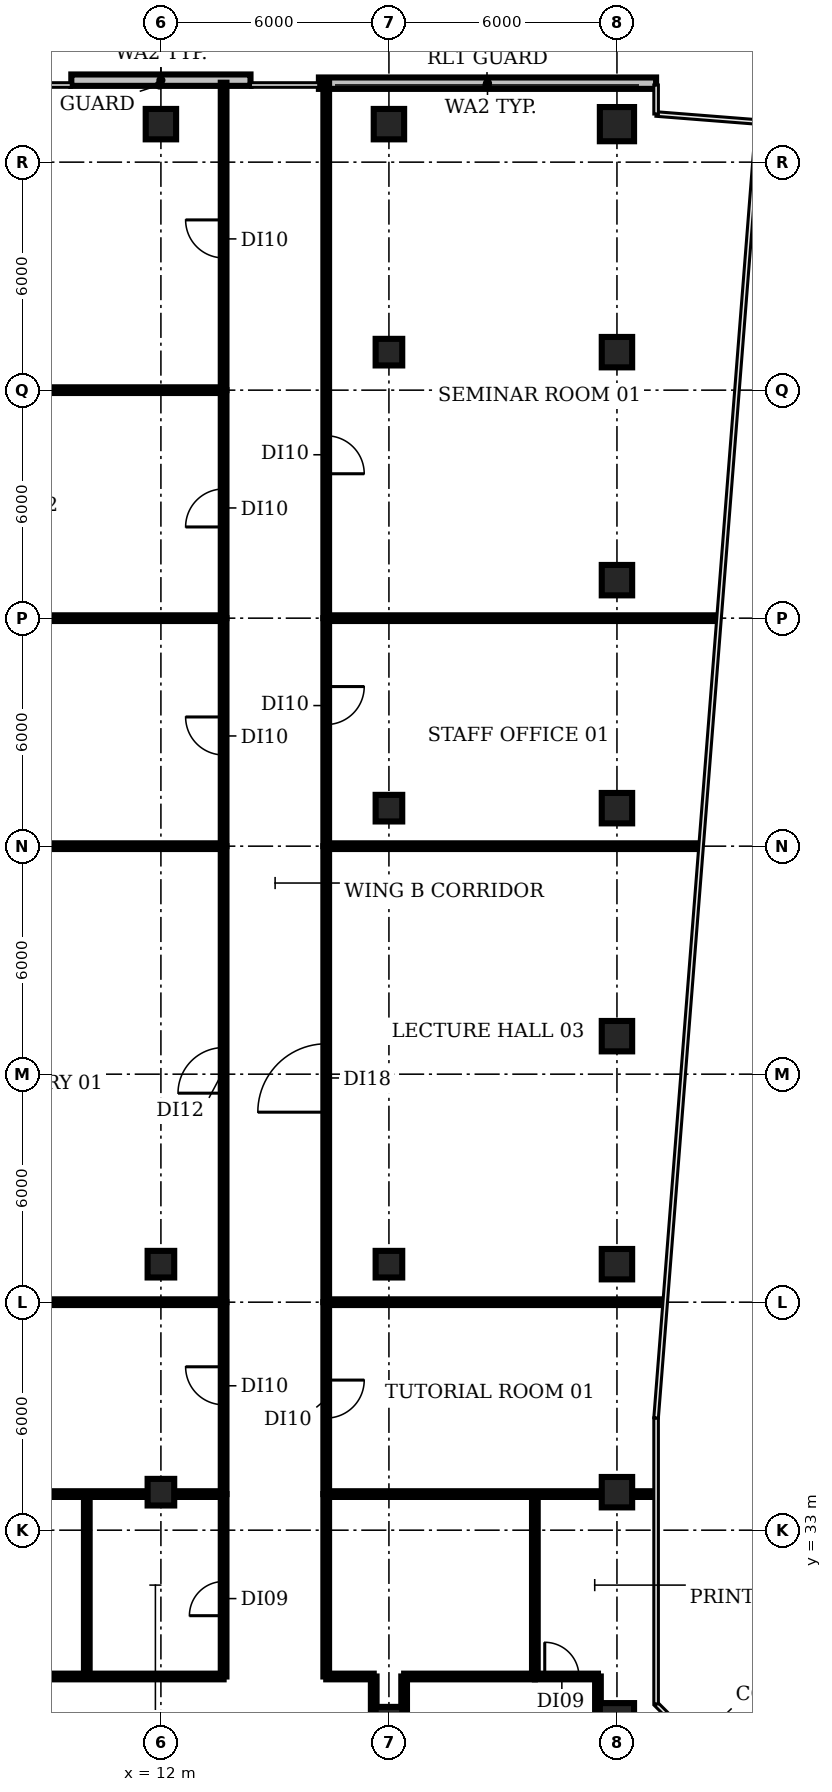
"""IFC4 building model, lengths in metres.
Left out: names, types, materials, properties, quantities, classifications, styles, units other than length and angle.
Written with IfcOpenShell. Run it as: python <this file> out.ifc"""

import sys

from ifc_helpers import new_model, si_unit, direction, frame, frame_2d, origin, origin_2d, place, context, subcontext, project, spatial, rectangle, circle, extrude, element, fill, save


model = new_model("IFC4")
c1 = context("Model", 3, precision=1e-05, world=origin(), true_north=direction((0.0, 1.0)))
c2 = subcontext(c1, "Body", "Model", "MODEL_VIEW")
j1 = project(units=[si_unit("LENGTHUNIT", "METRE"), si_unit("PLANEANGLEUNIT", "RADIAN")], contexts=[c1])
p1 = place(None, origin())
s1 = spatial("IfcSite", under=j1, at=p1, CompositionType="ELEMENT")
p2 = place(p1, origin())
s2 = spatial("IfcBuilding", under=s1, at=p2, CompositionType="ELEMENT")
p3 = place(p2, frame((0.0, 0.0, 247.4)))
s3 = spatial("IfcBuildingStorey", under=s2, at=p3, CompositionType="ELEMENT", Elevation=247.4)
for number, where, z_axis, x_axis in (
    (1, (12.0, 34.0, 0.0), (0.0, 0.0, 1.0), (1.0, 0.0, 0.0)),
    (2, (12.0, 40.0, 0.0), (0.0, 0.0, 1.0), (1.0, 0.0, 0.0)),
):
    element("IfcColumn", number, at=place(p3, frame(where, z_axis=z_axis, x_axis=x_axis)), inside=s3, PredefinedType="COLUMN", context=c2, shape_type="SweptSolid", body=[
        extrude(rectangle(XDim=0.7, YDim=0.7, at=origin_2d()), origin(), (0.0, 0.0, 1.0), 3.85),
    ])
p4 = place(p3, frame((12.0, 70.0, 0.0), z_axis=(0.0, 0.0, 1.0), x_axis=(1.0, 0.0, 0.0)))
e3 = element("IfcColumn", 3, at=p4, inside=s3, PredefinedType="COLUMN", context=c2, shape_type="SweptSolid", body=[
    extrude(rectangle(XDim=0.8, YDim=0.8, at=origin_2d()), origin(), (0.0, 0.0, 1.0), 3.85),
])
for number, where, z_axis, x_axis in (
    (4, (18.0, 28.0, 0.0), (0.0, 0.0, 1.0), (1.0, 0.0, 0.0)),
    (5, (18.0, 40.0, 0.0), (0.0, 0.0, 1.0), (1.0, 0.0, 0.0)),
    (6, (18.0, 52.0, 0.0), (0.0, 0.0, 1.0), (1.0, 0.0, 0.0)),
    (7, (18.0, 64.0, 0.0), (0.0, 0.0, 1.0), (1.0, 0.0, 0.0)),
):
    element("IfcColumn", number, at=place(p3, frame(where, z_axis=z_axis, x_axis=x_axis)), inside=s3, PredefinedType="COLUMN", context=c2, shape_type="SweptSolid", body=[
        extrude(rectangle(XDim=0.7, YDim=0.7, at=origin_2d()), origin(), (0.0, 0.0, 1.0), 3.85),
    ])
p5 = place(p3, frame((18.0, 70.0, 0.0), z_axis=(0.0, 0.0, 1.0), x_axis=(1.0, 0.0, 0.0)))
e8 = element("IfcColumn", 8, at=p5, inside=s3, PredefinedType="COLUMN", context=c2, shape_type="SweptSolid", body=[
    extrude(rectangle(XDim=0.8, YDim=0.8, at=origin_2d()), origin(), (0.0, 0.0, 1.0), 3.85),
])
p6 = place(p3, frame((24.0, 28.0, 0.0), z_axis=(0.0, 0.0, 1.0), x_axis=(1.0, 0.0, 0.0)))
e9 = element("IfcColumn", 9, at=p6, inside=s3, PredefinedType="COLUMN", context=c2, shape_type="SweptSolid", body=[
    extrude(circle(Radius=0.45, at=origin_2d()), origin(), (0.0, 0.0, 1.0), 3.85),
])
for number, where, z_axis, x_axis in (
    (10, (24.0, 34.0, 0.0), (0.0, 0.0, 1.0), (1.0, 0.0, 0.0)),
    (11, (24.0, 40.0, 0.0), (0.0, 0.0, 1.0), (1.0, 0.0, 0.0)),
    (12, (24.0, 46.0, 0.0), (0.0, 0.0, 1.0), (1.0, 0.0, 0.0)),
    (13, (24.0, 52.0, 0.0), (0.0, 0.0, 1.0), (1.0, 0.0, 0.0)),
    (14, (24.0, 58.0, 0.0), (0.0, 0.0, 1.0), (1.0, 0.0, 0.0)),
    (15, (24.0, 64.0, 0.0), (0.0, 0.0, 1.0), (1.0, 0.0, 0.0)),
):
    element("IfcColumn", number, at=place(p3, frame(where, z_axis=z_axis, x_axis=x_axis)), inside=s3, PredefinedType="COLUMN", context=c2, shape_type="SweptSolid", body=[
        extrude(rectangle(XDim=0.8, YDim=0.8, at=origin_2d()), origin(), (0.0, 0.0, 1.0), 3.85),
    ])
p7 = place(p3, frame((24.0, 70.0, 0.0), z_axis=(0.0, 0.0, 1.0), x_axis=(1.0, 0.0, 0.0)))
e16 = element("IfcColumn", 16, at=p7, inside=s3, PredefinedType="COLUMN", context=c2, shape_type="SweptSolid", body=[
    extrude(circle(Radius=0.45, at=origin_2d()), origin(), (0.0, 0.0, 1.0), 3.85),
])
p8 = place(p3, frame((25.03, 71.078, 0.0), z_axis=(0.0, 0.0, 1.0), x_axis=(-1.0, 0.0, 0.0)))
e17 = element("IfcWall", 17, at=p8, inside=s3, PredefinedType="SOLIDWALL", context=c2, shape_type="SweptSolid", body=[
    extrude(rectangle(XDim=8.873, YDim=0.3, at=frame_2d((4.436, 0.0))), origin(), (0.0, 0.0, 1.0), 3.85),
])
p9 = place(p3, frame((14.357, 71.157, 0.0), z_axis=(0.0, 0.0, 1.0), x_axis=(-1.0, 0.0, 0.0)))
e18 = element("IfcWall", 18, at=p9, inside=s3, PredefinedType="SOLIDWALL", context=c2, shape_type="SweptSolid", body=[
    extrude(rectangle(XDim=4.715, YDim=0.3, at=frame_2d((2.357, 0.0))), origin(), (0.0, 0.0, 1.0), 3.85),
])
p10 = place(p3, frame((-1.22, 33.95, 0.0), z_axis=(0.0, 0.0, 1.0), x_axis=(1.0, 0.0, 0.0)))
e19 = element("IfcWall", 19, at=p10, inside=s3, PredefinedType="PARTITIONING", context=c2, shape_type="SweptSolid", body=[
    extrude(rectangle(XDim=14.87, YDim=0.15, at=frame_2d((7.435, 0.0))), origin(), (0.0, 0.0, 1.0), 2.88),
])
for number, where, z_axis, x_axis in (
    (20, (-0.98, 39.0, 0.0), (0.0, 0.0, 1.0), (1.0, 0.0, 0.0)),
    (21, (-0.98, 51.0, 0.0), (0.0, 0.0, 1.0), (1.0, 0.0, 0.0)),
    (22, (-0.98, 57.0, 0.0), (0.0, 0.0, 1.0), (1.0, 0.0, 0.0)),
    (23, (-0.98, 63.0, 0.0), (0.0, 0.0, 1.0), (1.0, 0.0, 0.0)),
):
    element("IfcWall", number, at=place(p3, frame(where, z_axis=z_axis, x_axis=x_axis)), inside=s3, PredefinedType="PARTITIONING", context=c2, shape_type="SweptSolid", body=[
        extrude(rectangle(XDim=14.63, YDim=0.15, at=frame_2d((7.315, 0.0))), origin(), (0.0, 0.0, 1.0), 2.88),
    ])
p11 = place(p3, frame((6.4, 29.15, 0.0), z_axis=(0.0, 0.0, 1.0), x_axis=(1.0, 0.0, 0.0)))
e24 = element("IfcWall", 24, at=p11, inside=s3, PredefinedType="PARTITIONING", context=c2, shape_type="SweptSolid", body=[
    extrude(rectangle(XDim=7.25, YDim=0.15, at=frame_2d((3.625, 0.0))), origin(), (0.0, 0.0, 1.0), 2.88),
])
p12 = place(p3, frame((10.05, 29.15, 0.0), z_axis=(0.0, 0.0, 1.0), x_axis=(0.0, 1.0, 0.0)))
e25 = element("IfcWall", 25, at=p12, inside=s3, PredefinedType="PARTITIONING", context=c2, shape_type="SweptSolid", body=[
    extrude(rectangle(XDim=4.8, YDim=0.15, at=frame_2d((2.4, 0.0))), origin(), (0.0, 0.0, 1.0), 2.88),
])
p13 = place(p3, frame((13.65, 29.15, 0.0), z_axis=(0.0, 0.0, 1.0), x_axis=(0.0, 1.0, 0.0)))
e26 = element("IfcWall", 26, at=p13, inside=s3, PredefinedType="PARTITIONING", context=c2, shape_type="SweptSolid", body=[
    extrude(rectangle(XDim=4.8, YDim=0.15, at=frame_2d((2.4, 0.0))), origin(), (0.0, 0.0, 1.0), 2.88),
])
p14 = place(p13, frame((1.6, 0.0, 0.0)))
e27 = element("IfcOpeningElement", 27, at=p14, cuts=e26, PredefinedType="OPENING", context=c2, shape_type="SweptSolid", body=[
    extrude(rectangle(XDim=0.9, YDim=2.1, at=frame_2d((0.45, 1.05))), frame((0.0, 0.085, 0.0), z_axis=(0.0, -1.0, 0.0), x_axis=(1.0, 0.0, 0.0)), (0.0, 0.0, 1.0), 0.17),
])
p15 = place(p3, frame((13.65, 33.95, 0.0), z_axis=(0.0, 0.0, 1.0), x_axis=(0.0, 1.0, 0.0)))
e28 = element("IfcWall", 28, at=p15, inside=s3, PredefinedType="PARTITIONING", context=c2, shape_type="SweptSolid", body=[
    extrude(rectangle(XDim=5.05, YDim=0.15, at=frame_2d((2.525, 0.0))), origin(), (0.0, 0.0, 1.0), 2.88),
])
p16 = place(p15, frame((2.35, 0.0, 0.0)))
e29 = element("IfcOpeningElement", 29, at=p16, cuts=e28, PredefinedType="OPENING", context=c2, shape_type="SweptSolid", body=[
    extrude(rectangle(XDim=1.0, YDim=2.1, at=frame_2d((0.5, 1.05))), frame((0.0, 0.085, 0.0), z_axis=(0.0, -1.0, 0.0), x_axis=(1.0, 0.0, 0.0)), (0.0, 0.0, 1.0), 0.17),
])
p17 = place(p3, frame((13.65, 39.0, 0.0), z_axis=(0.0, 0.0, 1.0), x_axis=(0.0, 1.0, 0.0)))
e30 = element("IfcWall", 30, at=p17, inside=s3, PredefinedType="PARTITIONING", context=c2, shape_type="SweptSolid", body=[
    extrude(rectangle(XDim=12.0, YDim=0.15, at=frame_2d((6.0, 0.0))), origin(), (0.0, 0.0, 1.0), 2.88),
])
p18 = place(p17, frame((5.5, 0.0, 0.0)))
e31 = element("IfcOpeningElement", 31, at=p18, cuts=e30, PredefinedType="OPENING", context=c2, shape_type="SweptSolid", body=[
    extrude(rectangle(XDim=1.2, YDim=2.1, at=frame_2d((0.6, 1.05))), frame((0.0, 0.085, 0.0), z_axis=(0.0, -1.0, 0.0), x_axis=(1.0, 0.0, 0.0)), (0.0, 0.0, 1.0), 0.17),
])
p19 = place(p3, frame((13.65, 51.0, 0.0), z_axis=(0.0, 0.0, 1.0), x_axis=(0.0, 1.0, 0.0)))
e32 = element("IfcWall", 32, at=p19, inside=s3, PredefinedType="PARTITIONING", context=c2, shape_type="SweptSolid", body=[
    extrude(rectangle(XDim=6.0, YDim=0.15, at=frame_2d((3.0, 0.0))), origin(), (0.0, 0.0, 1.0), 2.88),
])
p20 = place(p19, frame((2.4, 0.0, 0.0)))
e33 = element("IfcOpeningElement", 33, at=p20, cuts=e32, PredefinedType="OPENING", context=c2, shape_type="SweptSolid", body=[
    extrude(rectangle(XDim=1.0, YDim=2.1, at=frame_2d((0.5, 1.05))), frame((0.0, 0.085, 0.0), z_axis=(0.0, -1.0, 0.0), x_axis=(1.0, 0.0, 0.0)), (0.0, 0.0, 1.0), 0.17),
])
p21 = place(p3, frame((13.65, 57.0, 0.0), z_axis=(0.0, 0.0, 1.0), x_axis=(0.0, 1.0, 0.0)))
e34 = element("IfcWall", 34, at=p21, inside=s3, PredefinedType="PARTITIONING", context=c2, shape_type="SweptSolid", body=[
    extrude(rectangle(XDim=6.0, YDim=0.15, at=frame_2d((3.0, 0.0))), origin(), (0.0, 0.0, 1.0), 2.88),
])
p22 = place(p21, frame((2.4, 0.0, 0.0)))
e35 = element("IfcOpeningElement", 35, at=p22, cuts=e34, PredefinedType="OPENING", context=c2, shape_type="SweptSolid", body=[
    extrude(rectangle(XDim=1.0, YDim=2.1, at=frame_2d((0.5, 1.05))), frame((0.0, 0.085, 0.0), z_axis=(0.0, -1.0, 0.0), x_axis=(1.0, 0.0, 0.0)), (0.0, 0.0, 1.0), 0.17),
])
p23 = place(p3, frame((13.65, 63.0, 0.0), z_axis=(0.0, 0.0, 1.0), x_axis=(0.0, 1.0, 0.0)))
e36 = element("IfcWall", 36, at=p23, inside=s3, PredefinedType="PARTITIONING", context=c2, shape_type="SweptSolid", body=[
    extrude(rectangle(XDim=8.09, YDim=0.15, at=frame_2d((4.045, 0.0))), origin(), (0.0, 0.0, 1.0), 2.88),
])
p24 = place(p23, frame((3.48, 0.0, 0.0)))
e37 = element("IfcOpeningElement", 37, at=p24, cuts=e36, PredefinedType="OPENING", context=c2, shape_type="SweptSolid", body=[
    extrude(rectangle(XDim=1.0, YDim=2.1, at=frame_2d((0.5, 1.05))), frame((0.0, 0.085, 0.0), z_axis=(0.0, -1.0, 0.0), x_axis=(1.0, 0.0, 0.0)), (0.0, 0.0, 1.0), 0.17),
])
p25 = place(p3, frame((16.35, 29.15, 0.0), z_axis=(0.0, 0.0, 1.0), x_axis=(0.0, 1.0, 0.0)))
e38 = element("IfcWall", 38, at=p25, inside=s3, PredefinedType="PARTITIONING", context=c2, shape_type="SweptSolid", body=[
    extrude(rectangle(XDim=4.8, YDim=0.15, at=frame_2d((2.4, 0.0))), origin(), (0.0, 0.0, 1.0), 2.88),
])
p26 = place(p3, frame((16.35, 29.15, 0.0), z_axis=(0.0, 0.0, 1.0), x_axis=(1.0, 0.0, 0.0)))
e39 = element("IfcWall", 39, at=p26, inside=s3, PredefinedType="PARTITIONING", context=c2, shape_type="SweptSolid", body=[
    extrude(rectangle(XDim=1.25, YDim=0.15, at=frame_2d((0.625, 0.0))), origin(), (0.0, 0.0, 1.0), 2.88),
])
p27 = place(p3, frame((16.35, 33.95, 0.0), z_axis=(0.0, 0.0, 1.0), x_axis=(1.0, 0.0, 0.0)))
e40 = element("IfcWall", 40, at=p27, inside=s3, PredefinedType="PARTITIONING", context=c2, shape_type="SweptSolid", body=[
    extrude(rectangle(XDim=8.63, YDim=0.15, at=frame_2d((4.315, 0.0))), origin(), (0.0, 0.0, 1.0), 2.88),
])
p28 = place(p3, frame((16.35, 39.0, 0.0), z_axis=(0.0, 0.0, 1.0), x_axis=(0.0, -1.0, 0.0)))
e41 = element("IfcWall", 41, at=p28, inside=s3, PredefinedType="PARTITIONING", context=c2, shape_type="SweptSolid", body=[
    extrude(rectangle(XDim=5.05, YDim=0.15, at=frame_2d((2.525, 0.0))), origin(), (0.0, 0.0, 1.0), 2.88),
])
p29 = place(p28, frame((2.05, 0.0, 0.0)))
e42 = element("IfcOpeningElement", 42, at=p29, cuts=e41, PredefinedType="OPENING", context=c2, shape_type="SweptSolid", body=[
    extrude(rectangle(XDim=1.0, YDim=2.1, at=frame_2d((0.5, 1.05))), frame((0.0, 0.085, 0.0), z_axis=(0.0, -1.0, 0.0), x_axis=(1.0, 0.0, 0.0)), (0.0, 0.0, 1.0), 0.17),
])
p30 = place(p3, frame((16.35, 39.0, 0.0), z_axis=(0.0, 0.0, 1.0), x_axis=(0.0, 1.0, 0.0)))
e43 = element("IfcWall", 43, at=p30, inside=s3, PredefinedType="PARTITIONING", context=c2, shape_type="SweptSolid", body=[
    extrude(rectangle(XDim=12.0, YDim=0.15, at=frame_2d((6.0, 0.0))), origin(), (0.0, 0.0, 1.0), 2.88),
])
p31 = place(p30, frame((5.0, 0.0, 0.0)))
e44 = element("IfcOpeningElement", 44, at=p31, cuts=e43, PredefinedType="OPENING", context=c2, shape_type="SweptSolid", body=[
    extrude(rectangle(XDim=1.8, YDim=2.1, at=frame_2d((0.9, 1.05))), frame((0.0, 0.085, 0.0), z_axis=(0.0, -1.0, 0.0), x_axis=(1.0, 0.0, 0.0)), (0.0, 0.0, 1.0), 0.17),
])
p32 = place(p3, frame((16.35, 39.0, 0.0), z_axis=(0.0, 0.0, 1.0), x_axis=(1.0, 0.0, 0.0)))
e45 = element("IfcWall", 45, at=p32, inside=s3, PredefinedType="PARTITIONING", context=c2, shape_type="SweptSolid", body=[
    extrude(rectangle(XDim=8.87, YDim=0.15, at=frame_2d((4.435, 0.0))), origin(), (0.0, 0.0, 1.0), 2.88),
])
p33 = place(p3, frame((16.35, 51.0, 0.0), z_axis=(0.0, 0.0, 1.0), x_axis=(1.0, 0.0, 0.0)))
e46 = element("IfcWall", 46, at=p33, inside=s3, PredefinedType="PARTITIONING", context=c2, shape_type="SweptSolid", body=[
    extrude(rectangle(XDim=9.81, YDim=0.15, at=frame_2d((4.905, 0.0))), origin(), (0.0, 0.0, 1.0), 2.88),
])
p34 = place(p3, frame((16.35, 57.0, 0.0), z_axis=(0.0, 0.0, 1.0), x_axis=(0.0, -1.0, 0.0)))
e47 = element("IfcWall", 47, at=p34, inside=s3, PredefinedType="PARTITIONING", context=c2, shape_type="SweptSolid", body=[
    extrude(rectangle(XDim=6.0, YDim=0.15, at=frame_2d((3.0, 0.0))), origin(), (0.0, 0.0, 1.0), 2.88),
])
p35 = place(p34, frame((1.8, 0.0, 0.0)))
e48 = element("IfcOpeningElement", 48, at=p35, cuts=e47, PredefinedType="OPENING", context=c2, shape_type="SweptSolid", body=[
    extrude(rectangle(XDim=1.0, YDim=2.1, at=frame_2d((0.5, 1.05))), frame((0.0, 0.085, 0.0), z_axis=(0.0, -1.0, 0.0), x_axis=(1.0, 0.0, 0.0)), (0.0, 0.0, 1.0), 0.17),
])
p36 = place(p3, frame((16.35, 57.0, 0.0), z_axis=(0.0, 0.0, 1.0), x_axis=(1.0, 0.0, 0.0)))
e49 = element("IfcWall", 49, at=p36, inside=s3, PredefinedType="PARTITIONING", context=c2, shape_type="SweptSolid", body=[
    extrude(rectangle(XDim=10.29, YDim=0.15, at=frame_2d((5.145, 0.0))), origin(), (0.0, 0.0, 1.0), 2.88),
])
p37 = place(p3, frame((16.35, 71.09, 0.0), z_axis=(0.0, 0.0, 1.0), x_axis=(0.0, -1.0, 0.0)))
e50 = element("IfcWall", 50, at=p37, inside=s3, PredefinedType="PARTITIONING", context=c2, shape_type="SweptSolid", body=[
    extrude(rectangle(XDim=14.09, YDim=0.15, at=frame_2d((7.045, 0.0))), origin(), (0.0, 0.0, 1.0), 2.88),
])
p38 = place(p37, frame((9.29, 0.0, 0.0)))
e51 = element("IfcOpeningElement", 51, at=p38, cuts=e50, PredefinedType="OPENING", context=c2, shape_type="SweptSolid", body=[
    extrude(rectangle(XDim=1.0, YDim=2.1, at=frame_2d((0.5, 1.05))), frame((0.0, 0.085, 0.0), z_axis=(0.0, -1.0, 0.0), x_axis=(1.0, 0.0, 0.0)), (0.0, 0.0, 1.0), 0.17),
])
for number, where, z_axis, x_axis in (
    (52, (17.6, 28.0, 0.0), (0.0, 0.0, 1.0), (0.0, 1.0, 0.0)),
    (53, (18.4, 28.0, 0.0), (0.0, 0.0, 1.0), (0.0, 1.0, 0.0)),
):
    element("IfcWall", number, at=place(p3, frame(where, z_axis=z_axis, x_axis=x_axis)), inside=s3, PredefinedType="PARTITIONING", context=c2, shape_type="SweptSolid", body=[
        extrude(rectangle(XDim=1.15, YDim=0.15, at=frame_2d((0.575, 0.0))), origin(), (0.0, 0.0, 1.0), 2.88),
    ])
p39 = place(p3, frame((18.4, 29.15, 0.0), z_axis=(0.0, 0.0, 1.0), x_axis=(1.0, 0.0, 0.0)))
e54 = element("IfcWall", 54, at=p39, inside=s3, PredefinedType="PARTITIONING", context=c2, shape_type="SweptSolid", body=[
    extrude(rectangle(XDim=3.44, YDim=0.15, at=frame_2d((1.72, 0.0))), origin(), (0.0, 0.0, 1.0), 2.88),
])
p40 = place(p3, frame((21.84, 29.15, 0.0), z_axis=(0.0, 0.0, 1.0), x_axis=(0.0, 1.0, 0.0)))
e55 = element("IfcWall", 55, at=p40, inside=s3, PredefinedType="PARTITIONING", context=c2, shape_type="SweptSolid", body=[
    extrude(rectangle(XDim=4.8, YDim=0.15, at=frame_2d((2.4, 0.0))), origin(), (0.0, 0.0, 1.0), 2.88),
])
p41 = place(p3, frame((21.84, 29.15, 0.0), z_axis=(0.0, 0.0, 1.0), x_axis=(1.0, 0.0, 0.0)))
e56 = element("IfcWall", 56, at=p41, inside=s3, PredefinedType="PARTITIONING", context=c2, shape_type="SweptSolid", body=[
    extrude(rectangle(XDim=1.66, YDim=0.15, at=frame_2d((0.83, 0.0))), origin(), (0.0, 0.0, 1.0), 2.88),
])
p42 = place(p41, frame((0.26, 0.0, 0.0)))
e57 = element("IfcOpeningElement", 57, at=p42, cuts=e56, PredefinedType="OPENING", context=c2, shape_type="SweptSolid", body=[
    extrude(rectangle(XDim=0.9, YDim=2.1, at=frame_2d((0.45, 1.05))), frame((0.0, 0.085, 0.0), z_axis=(0.0, -1.0, 0.0), x_axis=(1.0, 0.0, 0.0)), (0.0, 0.0, 1.0), 0.17),
])
p43 = place(p3, frame((23.5, 28.0, 0.0), z_axis=(0.0, 0.0, 1.0), x_axis=(0.0, 1.0, 0.0)))
e58 = element("IfcWall", 58, at=p43, inside=s3, PredefinedType="PARTITIONING", context=c2, shape_type="SweptSolid", body=[
    extrude(rectangle(XDim=1.15, YDim=0.15, at=frame_2d((0.575, 0.0))), origin(), (0.0, 0.0, 1.0), 2.88),
])
p44 = place(p14, origin())
e59 = element("IfcDoor", 59, at=p44, inside=s3, OperationType="SINGLE_SWING_LEFT", PredefinedType="DOOR", context=c2, shape_type="SweptSolid", body=[
    extrude(rectangle(XDim=0.9, YDim=2.1, at=frame_2d((0.45, 1.05))), frame((0.0, 0.025, 0.0), z_axis=(0.0, -1.0, 0.0), x_axis=(1.0, 0.0, 0.0)), (0.0, 0.0, 1.0), 0.05),
])
fill(e27, e59)
p45 = place(p16, origin())
e60 = element("IfcDoor", 60, at=p45, inside=s3, OperationType="SINGLE_SWING_RIGHT", PredefinedType="DOOR", context=c2, shape_type="SweptSolid", body=[
    extrude(rectangle(XDim=1.0, YDim=2.1, at=frame_2d((0.5, 1.05))), frame((0.0, 0.025, 0.0), z_axis=(0.0, -1.0, 0.0), x_axis=(1.0, 0.0, 0.0)), (0.0, 0.0, 1.0), 0.05),
])
fill(e29, e60)
p46 = place(p18, origin())
e61 = element("IfcDoor", 61, at=p46, inside=s3, OperationType="SINGLE_SWING_LEFT", PredefinedType="DOOR", context=c2, shape_type="SweptSolid", body=[
    extrude(rectangle(XDim=1.2, YDim=2.1, at=frame_2d((0.6, 1.05))), frame((0.0, 0.025, 0.0), z_axis=(0.0, -1.0, 0.0), x_axis=(1.0, 0.0, 0.0)), (0.0, 0.0, 1.0), 0.05),
])
fill(e31, e61)
p47 = place(p20, origin())
e62 = element("IfcDoor", 62, at=p47, inside=s3, OperationType="SINGLE_SWING_RIGHT", PredefinedType="DOOR", context=c2, shape_type="SweptSolid", body=[
    extrude(rectangle(XDim=1.0, YDim=2.1, at=frame_2d((0.5, 1.05))), frame((0.0, 0.025, 0.0), z_axis=(0.0, -1.0, 0.0), x_axis=(1.0, 0.0, 0.0)), (0.0, 0.0, 1.0), 0.05),
])
fill(e33, e62)
p48 = place(p22, origin())
e63 = element("IfcDoor", 63, at=p48, inside=s3, OperationType="SINGLE_SWING_LEFT", PredefinedType="DOOR", context=c2, shape_type="SweptSolid", body=[
    extrude(rectangle(XDim=1.0, YDim=2.1, at=frame_2d((0.5, 1.05))), frame((0.0, 0.025, 0.0), z_axis=(0.0, -1.0, 0.0), x_axis=(1.0, 0.0, 0.0)), (0.0, 0.0, 1.0), 0.05),
])
fill(e35, e63)
p49 = place(p24, origin())
e64 = element("IfcDoor", 64, at=p49, inside=s3, OperationType="SINGLE_SWING_RIGHT", PredefinedType="DOOR", context=c2, shape_type="SweptSolid", body=[
    extrude(rectangle(XDim=1.0, YDim=2.1, at=frame_2d((0.5, 1.05))), frame((0.0, 0.025, 0.0), z_axis=(0.0, -1.0, 0.0), x_axis=(1.0, 0.0, 0.0)), (0.0, 0.0, 1.0), 0.05),
])
fill(e37, e64)
p50 = place(p29, origin())
e65 = element("IfcDoor", 65, at=p50, inside=s3, OperationType="SINGLE_SWING_LEFT", PredefinedType="DOOR", context=c2, shape_type="SweptSolid", body=[
    extrude(rectangle(XDim=1.0, YDim=2.1, at=frame_2d((0.5, 1.05))), frame((0.0, 0.025, 0.0), z_axis=(0.0, -1.0, 0.0), x_axis=(1.0, 0.0, 0.0)), (0.0, 0.0, 1.0), 0.05),
])
fill(e42, e65)
p51 = place(p31, origin())
e66 = element("IfcDoor", 66, at=p51, inside=s3, OperationType="SINGLE_SWING_LEFT", PredefinedType="DOOR", context=c2, shape_type="SweptSolid", body=[
    extrude(rectangle(XDim=1.8, YDim=2.1, at=frame_2d((0.9, 1.05))), frame((0.0, 0.025, 0.0), z_axis=(0.0, -1.0, 0.0), x_axis=(1.0, 0.0, 0.0)), (0.0, 0.0, 1.0), 0.05),
])
fill(e44, e66)
p52 = place(p35, origin())
e67 = element("IfcDoor", 67, at=p52, inside=s3, OperationType="SINGLE_SWING_LEFT", PredefinedType="DOOR", context=c2, shape_type="SweptSolid", body=[
    extrude(rectangle(XDim=1.0, YDim=2.1, at=frame_2d((0.5, 1.05))), frame((0.0, 0.025, 0.0), z_axis=(0.0, -1.0, 0.0), x_axis=(1.0, 0.0, 0.0)), (0.0, 0.0, 1.0), 0.05),
])
fill(e48, e67)
p53 = place(p38, origin())
e68 = element("IfcDoor", 68, at=p53, inside=s3, OperationType="SINGLE_SWING_RIGHT", PredefinedType="DOOR", context=c2, shape_type="SweptSolid", body=[
    extrude(rectangle(XDim=1.0, YDim=2.1, at=frame_2d((0.5, 1.05))), frame((0.0, 0.025, 0.0), z_axis=(0.0, -1.0, 0.0), x_axis=(1.0, 0.0, 0.0)), (0.0, 0.0, 1.0), 0.05),
])
fill(e51, e68)
p54 = place(p42, origin())
e69 = element("IfcDoor", 69, at=p54, inside=s3, OperationType="SINGLE_SWING_LEFT", PredefinedType="DOOR", context=c2, shape_type="SweptSolid", body=[
    extrude(rectangle(XDim=0.9, YDim=2.1, at=frame_2d((0.45, 1.05))), frame((0.0, 0.025, 0.0), z_axis=(0.0, -1.0, 0.0), x_axis=(1.0, 0.0, 0.0)), (0.0, 0.0, 1.0), 0.05),
])
fill(e57, e69)
save(model, sys.argv[1])
